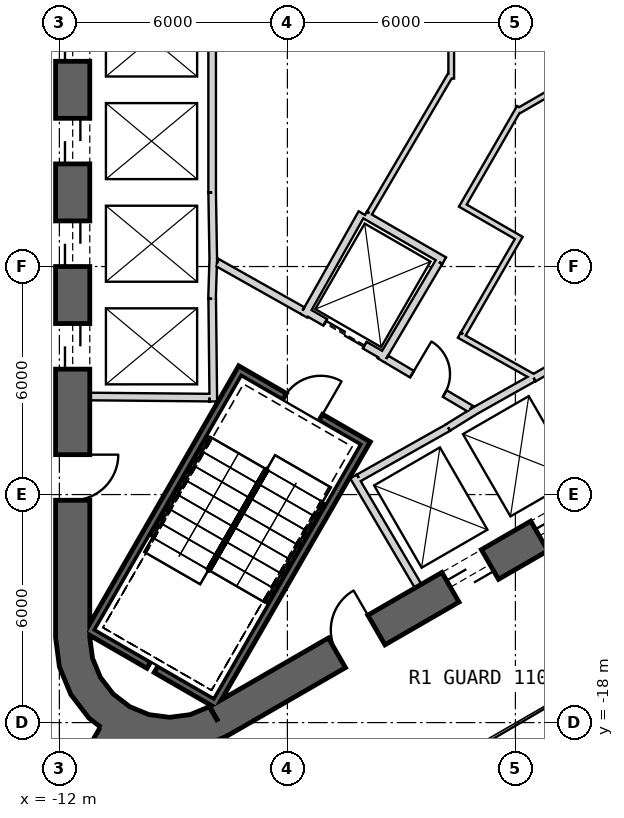
"""IFC4 building model, lengths in metres.
Left out: names, types, materials, properties, quantities, classifications, styles, units other than length and angle.
Written with IfcOpenShell. Run it as: python <this file> out.ifc"""

import sys

from ifc_helpers import new_model, si_unit, direction, frame, frame_2d, origin, place, context, subcontext, project, spatial, polyline, rectangle, outline, extrude, element, fill, save


model = new_model("IFC4")
c1 = context("Model", 3, precision=1e-05, world=origin(), true_north=direction((0.0, 1.0)))
c2 = subcontext(c1, "Body", "Model", "MODEL_VIEW")
j1 = project(units=[si_unit("LENGTHUNIT", "METRE"), si_unit("PLANEANGLEUNIT", "RADIAN")], contexts=[c1])
p1 = place(None, origin())
s1 = spatial("IfcSite", under=j1, at=p1, CompositionType="ELEMENT")
p2 = place(p1, origin())
s2 = spatial("IfcBuilding", under=s1, at=p2, CompositionType="ELEMENT")
p3 = place(p2, frame((0.0, 0.0, 21.5)))
s3 = spatial("IfcBuildingStorey", under=s2, at=p3, CompositionType="ELEMENT", Elevation=21.5)
p4 = place(p3, frame((-11.65, 15.762, 0.0), z_axis=(0.0, 0.0, 1.0), x_axis=(0.0, -1.0, 0.0)))
e1 = element("IfcWall", 1, at=p4, inside=s3, PredefinedType="SHEAR", context=c2, shape_type="SweptSolid", body=[
    extrude(rectangle(XDim=31.523, YDim=0.9, at=frame_2d((15.762, 0.0))), origin(), (0.0, 0.0, 1.0), 6.0),
])
p5 = place(p4, frame((7.062, 0.0, 0.0)))
e2 = element("IfcOpeningElement", 2, at=p5, cuts=e1, PredefinedType="OPENING", context=c2, shape_type="SweptSolid", body=[
    extrude(rectangle(XDim=1.2, YDim=2.4, at=frame_2d((0.6, 1.2))), frame((0.0, 0.46, 0.0), z_axis=(0.0, -1.0, 0.0), x_axis=(1.0, 0.0, 0.0)), (0.0, 0.0, 1.0), 0.92),
])
p6 = place(p4, frame((9.762, 0.0, 0.0)))
e3 = element("IfcOpeningElement", 3, at=p6, cuts=e1, PredefinedType="OPENING", context=c2, shape_type="SweptSolid", body=[
    extrude(rectangle(XDim=1.2, YDim=2.4, at=frame_2d((0.6, 1.2))), frame((0.0, 0.46, 0.0), z_axis=(0.0, -1.0, 0.0), x_axis=(1.0, 0.0, 0.0)), (0.0, 0.0, 1.0), 0.92),
])
p7 = place(p4, frame((12.462, 0.0, 0.0)))
e4 = element("IfcOpeningElement", 4, at=p7, cuts=e1, PredefinedType="OPENING", context=c2, shape_type="SweptSolid", body=[
    extrude(rectangle(XDim=1.2, YDim=2.4, at=frame_2d((0.6, 1.2))), frame((0.0, 0.46, 0.0), z_axis=(0.0, -1.0, 0.0), x_axis=(1.0, 0.0, 0.0)), (0.0, 0.0, 1.0), 0.92),
])
p8 = place(p4, frame((15.162, 0.0, 0.0)))
e5 = element("IfcOpeningElement", 5, at=p8, cuts=e1, PredefinedType="OPENING", context=c2, shape_type="SweptSolid", body=[
    extrude(rectangle(XDim=1.2, YDim=2.4, at=frame_2d((0.6, 1.2))), frame((0.0, 0.46, 0.0), z_axis=(0.0, -1.0, 0.0), x_axis=(1.0, 0.0, 0.0)), (0.0, 0.0, 1.0), 0.92),
])
p9 = place(p4, frame((17.862, 0.0, 0.0)))
e6 = element("IfcOpeningElement", 6, at=p9, cuts=e1, PredefinedType="OPENING", context=c2, shape_type="SweptSolid", body=[
    extrude(rectangle(XDim=1.2, YDim=2.4, at=frame_2d((0.6, 1.2))), frame((0.0, 0.46, 0.0), z_axis=(0.0, -1.0, 0.0), x_axis=(1.0, 0.0, 0.0)), (0.0, 0.0, 1.0), 0.92),
])
p10 = place(p4, frame((20.562, 0.0, 0.0)))
e7 = element("IfcOpeningElement", 7, at=p10, cuts=e1, PredefinedType="OPENING", context=c2, shape_type="SweptSolid", body=[
    extrude(rectangle(XDim=1.2, YDim=2.4, at=frame_2d((0.6, 1.2))), frame((0.0, 0.46, 0.0), z_axis=(0.0, -1.0, 0.0), x_axis=(1.0, 0.0, 0.0)), (0.0, 0.0, 1.0), 0.92),
])
p11 = place(p4, frame((23.262, 0.0, 0.0)))
e8 = element("IfcOpeningElement", 8, at=p11, cuts=e1, PredefinedType="OPENING", context=c2, shape_type="SweptSolid", body=[
    extrude(rectangle(XDim=1.2, YDim=2.4, at=frame_2d((0.6, 1.2))), frame((0.0, 0.46, 0.0), z_axis=(0.0, -1.0, 0.0), x_axis=(1.0, 0.0, 0.0)), (0.0, 0.0, 1.0), 0.92),
])
p12 = place(p4, frame((3.612, 0.0, 0.0)))
e9 = element("IfcOpeningElement", 9, at=p12, cuts=e1, PredefinedType="OPENING", context=c2, shape_type="SweptSolid", body=[
    extrude(rectangle(XDim=1.2, YDim=2.4, at=frame_2d((0.6, 1.2))), frame((0.0, 0.46, 0.0), z_axis=(0.0, -1.0, 0.0), x_axis=(1.0, 0.0, 0.0)), (0.0, 0.0, 1.0), 0.92),
])
p13 = place(p4, frame((26.712, 0.0, 0.0)))
e10 = element("IfcOpeningElement", 10, at=p13, cuts=e1, PredefinedType="OPENING", context=c2, shape_type="SweptSolid", body=[
    extrude(rectangle(XDim=1.2, YDim=2.4, at=frame_2d((0.6, 1.2))), frame((0.0, 0.46, 0.0), z_axis=(0.0, -1.0, 0.0), x_axis=(1.0, 0.0, 0.0)), (0.0, 0.0, 1.0), 0.92),
])
p14 = place(p3, frame((-7.825, -17.97, 0.0), z_axis=(0.0, 0.0, 1.0), x_axis=(0.866028369851, 0.499994862586, 0.0)))
e11 = element("IfcWall", 11, at=p14, inside=s3, PredefinedType="SHEAR", context=c2, shape_type="SweptSolid", body=[
    extrude(rectangle(XDim=31.523, YDim=0.9, at=frame_2d((15.762, 0.0))), origin(), (0.0, 0.0, 1.0), 6.0),
])
p15 = place(p14, frame((7.062, 0.0, 0.0)))
e12 = element("IfcOpeningElement", 12, at=p15, cuts=e11, PredefinedType="OPENING", context=c2, shape_type="SweptSolid", body=[
    extrude(rectangle(XDim=1.2, YDim=2.4, at=frame_2d((0.6, 1.2))), frame((0.0, 0.46, 0.0), z_axis=(0.0, -1.0, 0.0), x_axis=(1.0, 0.0, 0.0)), (0.0, 0.0, 1.0), 0.92),
])
p16 = place(p14, frame((9.762, 0.0, 0.0)))
e13 = element("IfcOpeningElement", 13, at=p16, cuts=e11, PredefinedType="OPENING", context=c2, shape_type="SweptSolid", body=[
    extrude(rectangle(XDim=1.2, YDim=2.4, at=frame_2d((0.6, 1.2))), frame((0.0, 0.46, 0.0), z_axis=(0.0, -1.0, 0.0), x_axis=(1.0, 0.0, 0.0)), (0.0, 0.0, 1.0), 0.92),
])
p17 = place(p14, frame((12.462, 0.0, 0.0)))
e14 = element("IfcOpeningElement", 14, at=p17, cuts=e11, PredefinedType="OPENING", context=c2, shape_type="SweptSolid", body=[
    extrude(rectangle(XDim=1.2, YDim=2.4, at=frame_2d((0.6, 1.2))), frame((0.0, 0.46, 0.0), z_axis=(0.0, -1.0, 0.0), x_axis=(1.0, 0.0, 0.0)), (0.0, 0.0, 1.0), 0.92),
])
p18 = place(p14, frame((15.162, 0.0, 0.0)))
e15 = element("IfcOpeningElement", 15, at=p18, cuts=e11, PredefinedType="OPENING", context=c2, shape_type="SweptSolid", body=[
    extrude(rectangle(XDim=1.2, YDim=2.4, at=frame_2d((0.6, 1.2))), frame((0.0, 0.46, 0.0), z_axis=(0.0, -1.0, 0.0), x_axis=(1.0, 0.0, 0.0)), (0.0, 0.0, 1.0), 0.92),
])
p19 = place(p14, frame((17.862, 0.0, 0.0)))
e16 = element("IfcOpeningElement", 16, at=p19, cuts=e11, PredefinedType="OPENING", context=c2, shape_type="SweptSolid", body=[
    extrude(rectangle(XDim=1.2, YDim=2.4, at=frame_2d((0.6, 1.2))), frame((0.0, 0.46, 0.0), z_axis=(0.0, -1.0, 0.0), x_axis=(1.0, 0.0, 0.0)), (0.0, 0.0, 1.0), 0.92),
])
p20 = place(p14, frame((20.562, 0.0, 0.0)))
e17 = element("IfcOpeningElement", 17, at=p20, cuts=e11, PredefinedType="OPENING", context=c2, shape_type="SweptSolid", body=[
    extrude(rectangle(XDim=1.2, YDim=2.4, at=frame_2d((0.6, 1.2))), frame((0.0, 0.46, 0.0), z_axis=(0.0, -1.0, 0.0), x_axis=(1.0, 0.0, 0.0)), (0.0, 0.0, 1.0), 0.92),
])
p21 = place(p14, frame((26.712, 0.0, 0.0)))
e18 = element("IfcOpeningElement", 18, at=p21, cuts=e11, PredefinedType="OPENING", context=c2, shape_type="SweptSolid", body=[
    extrude(rectangle(XDim=1.2, YDim=2.4, at=frame_2d((0.6, 1.2))), frame((0.0, 0.46, 0.0), z_axis=(0.0, -1.0, 0.0), x_axis=(1.0, 0.0, 0.0)), (0.0, 0.0, 1.0), 0.92),
])
p22 = place(p14, frame((3.612, 0.0, 0.0)))
e19 = element("IfcOpeningElement", 19, at=p22, cuts=e11, PredefinedType="OPENING", context=c2, shape_type="SweptSolid", body=[
    extrude(rectangle(XDim=1.2, YDim=2.4, at=frame_2d((0.6, 1.2))), frame((0.0, 0.46, 0.0), z_axis=(0.0, -1.0, 0.0), x_axis=(1.0, 0.0, 0.0)), (0.0, 0.0, 1.0), 0.92),
])
p23 = place(p3, origin())
e20 = element("IfcWall", 20, at=p23, inside=s3, PredefinedType="SHEAR", context=c2, shape_type="SweptSolid", body=[
    extrude(outline(polyline([(-12.1, -15.762), (-11.998, -16.538), (-11.698, -17.262), (-11.221, -17.883), (-10.6, -18.36), (-9.876, -18.659), (-9.1, -18.762), (-8.323, -18.659), (-7.6, -18.36), (-8.05, -17.58), (-8.556, -17.79), (-9.1, -17.862), (-9.644, -17.79), (-10.15, -17.58), (-10.585, -17.247), (-10.919, -16.812), (-11.128, -16.305), (-11.2, -15.762), (-12.1, -15.762)])), origin(), (0.0, 0.0, 1.0), 6.0),
])
p24 = place(p3, frame((-10.575, -18.316, 0.0), z_axis=(0.0, 0.0, 1.0), x_axis=(-0.499996575515, -0.866027380903, 0.0)))
e21 = element("IfcWall", 21, at=p24, inside=s3, PredefinedType="SHEAR", context=c2, shape_type="SweptSolid", body=[
    extrude(rectangle(XDim=13.954, YDim=0.8, at=frame_2d((6.977, 0.0))), origin(), (0.0, 0.0, 1.0), 6.0),
])
p25 = place(p24, frame((2.05, 0.0, 0.0)))
e22 = element("IfcOpeningElement", 22, at=p25, cuts=e21, PredefinedType="OPENING", context=c2, shape_type="SweptSolid", body=[
    extrude(rectangle(XDim=1.4, YDim=2.4, at=frame_2d((0.7, 1.2))), frame((0.0, 0.41, 0.0), z_axis=(0.0, -1.0, 0.0), x_axis=(1.0, 0.0, 0.0)), (0.0, 0.0, 1.0), 0.82),
])
p26 = place(p3, frame((-7.98, 4.05, 0.0), z_axis=(0.0, 0.0, 1.0), x_axis=(0.0, -1.0, 0.0)))
e23 = element("IfcWall", 23, at=p26, inside=s3, PredefinedType="PLUMBINGWALL", context=c2, shape_type="SweptSolid", body=[
    extrude(rectangle(XDim=8.1, YDim=0.2, at=frame_2d((4.05, 0.0))), origin(), (0.0, 0.0, 1.0), 5.7),
])
p27 = place(p3, frame((-7.95, -5.772, 0.0), z_axis=(0.0, 0.0, 1.0), x_axis=(-0.030803413295, -0.999525462272, 0.0)))
e24 = element("IfcWall", 24, at=p27, inside=s3, PredefinedType="PLUMBINGWALL", context=c2, shape_type="SweptSolid", body=[
    extrude(rectangle(XDim=1.078, YDim=0.2, at=frame_2d((0.539, 0.0))), origin(), (0.0, 0.0, 1.0), 5.7),
])
p28 = place(p3, frame((-7.98, -4.05, 0.0), z_axis=(0.0, 0.0, 1.0), x_axis=(0.016809909365, -0.999858703491, 0.0)))
e25 = element("IfcWall", 25, at=p28, inside=s3, PredefinedType="PLUMBINGWALL", context=c2, shape_type="SweptSolid", body=[
    extrude(rectangle(XDim=1.844, YDim=0.2, at=frame_2d((0.922, 0.0))), origin(), (0.0, 0.0, 1.0), 5.7),
])
p29 = place(p3, frame((-7.979, -6.85, 0.0), z_axis=(0.0, 0.0, 1.0), x_axis=(0.011121475088, -0.999938154483, 0.0)))
e26 = element("IfcWall", 26, at=p29, inside=s3, PredefinedType="PLUMBINGWALL", context=c2, shape_type="SweptSolid", body=[
    extrude(rectangle(XDim=2.7, YDim=0.2, at=frame_2d((1.35, 0.0))), origin(), (0.0, 0.0, 1.0), 5.7),
])
p30 = place(p3, frame((-8.05, -9.449, 0.0), z_axis=(0.0, 0.0, 1.0), x_axis=(-0.999957467379, 0.009222983926, 0.0)))
e27 = element("IfcWall", 27, at=p30, inside=s3, PredefinedType="PLUMBINGWALL", context=c2, shape_type="SweptSolid", body=[
    extrude(rectangle(XDim=3.15, YDim=0.2, at=frame_2d((1.575, 0.0))), origin(), (0.0, 0.0, 1.0), 5.7),
])
p31 = place(p3, frame((0.483, -8.936, 0.0), z_axis=(0.0, 0.0, 1.0), x_axis=(0.866030989016, 0.499990325971, 0.0)))
e28 = element("IfcWall", 28, at=p31, inside=s3, PredefinedType="PLUMBINGWALL", context=c2, shape_type="SweptSolid", body=[
    extrude(rectangle(XDim=8.1, YDim=0.2, at=frame_2d((4.05, 0.0))), origin(), (0.0, 0.0, 1.0), 5.7),
])
p32 = place(p3, frame((-2.558, -14.409, 0.0), z_axis=(0.0, 0.0, 1.0), x_axis=(-0.507997497166, 0.861358544901, 0.0)))
e29 = element("IfcWall", 29, at=p32, inside=s3, PredefinedType="PLUMBINGWALL", context=c2, shape_type="SweptSolid", body=[
    extrude(rectangle(XDim=3.35, YDim=0.2, at=frame_2d((1.675, 0.0))), origin(), (0.0, 0.0, 1.0), 5.7),
])
p33 = place(p3, frame((-1.769, -10.237, 0.0), z_axis=(0.0, 0.0, 1.0), x_axis=(-0.871534483978, -0.490334215854, 0.0)))
e30 = element("IfcWall", 30, at=p33, inside=s3, PredefinedType="PLUMBINGWALL", context=c2, shape_type="SweptSolid", body=[
    extrude(rectangle(XDim=2.7, YDim=0.2, at=frame_2d((1.35, 0.0))), origin(), (0.0, 0.0, 1.0), 5.7),
])
p34 = place(p3, frame((-1.024, -9.771, 0.0), z_axis=(0.0, 0.0, 1.0), x_axis=(-0.850348075135, -0.526220629693, 0.0)))
e31 = element("IfcWall", 31, at=p34, inside=s3, PredefinedType="PLUMBINGWALL", context=c2, shape_type="SweptSolid", body=[
    extrude(rectangle(XDim=0.878, YDim=0.2, at=frame_2d((0.439, 0.0))), origin(), (0.0, 0.0, 1.0), 5.7),
])
p35 = place(p3, frame((-1.13, -9.832, 0.0), z_axis=(0.0, 0.0, 1.0), x_axis=(0.871988740738, 0.489525929882, 0.0)))
e32 = element("IfcWall", 32, at=p35, inside=s3, PredefinedType="PLUMBINGWALL", context=c2, shape_type="SweptSolid", body=[
    extrude(rectangle(XDim=1.845, YDim=0.2, at=frame_2d((0.922, 0.0))), origin(), (0.0, 0.0, 1.0), 5.7),
])
p36 = place(p3, frame((-3.905, -10.563, -0.3), z_axis=(0.0, 0.0, 1.0), x_axis=(-0.500012932018, -0.866017937352, 0.0)))
e33 = element("IfcWall", 33, at=p36, inside=s3, PredefinedType="SHEAR", context=c2, shape_type="SweptSolid", body=[
    extrude(rectangle(XDim=8.1, YDim=0.2, at=frame_2d((4.05, 0.0))), origin(), (0.0, 0.0, 1.0), 6.0),
])
p37 = place(p3, frame((-11.282, -15.541, -0.3), z_axis=(0.0, 0.0, 1.0), x_axis=(0.866000578957, -0.500042995397, 0.0)))
e34 = element("IfcWall", 34, at=p37, inside=s3, PredefinedType="SHEAR", context=c2, shape_type="SweptSolid", body=[
    extrude(rectangle(XDim=1.89, YDim=0.2, at=frame_2d((0.945, 0.0))), origin(), (0.0, 0.0, 1.0), 6.0),
])
p38 = place(p3, frame((-9.455, -16.596, -0.3), z_axis=(0.0, 0.0, 1.0), x_axis=(0.866038843867, -0.499976720371, 0.0)))
e35 = element("IfcWall", 35, at=p38, inside=s3, PredefinedType="SHEAR", context=c2, shape_type="SweptSolid", body=[
    extrude(rectangle(XDim=1.69, YDim=0.2, at=frame_2d((0.845, 0.0))), origin(), (0.0, 0.0, 1.0), 6.0),
])
p39 = place(p3, frame((-7.196, -8.663, -0.3), z_axis=(0.0, 0.0, 1.0), x_axis=(-0.499997992926, -0.866026562566, 0.0)))
e36 = element("IfcWall", 36, at=p39, inside=s3, PredefinedType="SHEAR", context=c2, shape_type="SweptSolid", body=[
    extrude(rectangle(XDim=7.9, YDim=0.2, at=frame_2d((3.95, 0.0))), origin(), (0.0, 0.0, 1.0), 6.0),
])
p40 = place(p3, frame((-4.041, -10.599, -0.3), z_axis=(0.0, 0.0, 1.0), x_axis=(-0.866047807691, 0.499961193289, 0.0)))
e37 = element("IfcWall", 37, at=p40, inside=s3, PredefinedType="SHEAR", context=c2, shape_type="SweptSolid", body=[
    extrude(rectangle(XDim=3.6, YDim=0.2, at=frame_2d((1.8, 0.0))), origin(), (0.0, 0.0, 1.0), 6.0),
])
p41 = place(p40, frame((1.25, 0.0, 0.3)))
e38 = element("IfcOpeningElement", 38, at=p41, cuts=e37, PredefinedType="OPENING", context=c2, shape_type="SweptSolid", body=[
    extrude(rectangle(XDim=1.1, YDim=2.1, at=frame_2d((0.55, 1.05))), frame((0.0, 0.11, 0.0), z_axis=(0.0, -1.0, 0.0), x_axis=(1.0, 0.0, 0.0)), (0.0, 0.0, 1.0), 0.22),
])
p42 = place(p3, frame((-3.446, -8.368, 0.0), z_axis=(0.0, 0.0, 1.0), x_axis=(-0.866024647952, 0.500001309137, 0.0)))
e39 = element("IfcWall", 39, at=p42, inside=s3, PredefinedType="PLUMBINGWALL", context=c2, shape_type="SweptSolid", body=[
    extrude(rectangle(XDim=2.4, YDim=0.2, at=frame_2d((1.2, 0.0))), origin(), (0.0, 0.0, 1.0), 5.7),
])
p43 = place(p42, frame((0.6, 0.0, 0.0)))
e40 = element("IfcOpeningElement", 40, at=p43, cuts=e39, PredefinedType="OPENING", context=c2, shape_type="SweptSolid", body=[
    extrude(rectangle(XDim=1.2, YDim=2.4, at=frame_2d((0.6, 1.2))), frame((0.0, 0.11, 0.0), z_axis=(0.0, -1.0, 0.0), x_axis=(1.0, 0.0, 0.0)), (0.0, 0.0, 1.0), 0.22),
])
p44 = place(p3, frame((-5.562, -7.296, 0.0), z_axis=(0.0, 0.0, 1.0), x_axis=(0.491322718731, 0.870977603649, 0.0)))
e41 = element("IfcWall", 41, at=p44, inside=s3, PredefinedType="PLUMBINGWALL", context=c2, shape_type="SweptSolid", body=[
    extrude(rectangle(XDim=3.1, YDim=0.2, at=frame_2d((1.55, 0.0))), origin(), (0.0, 0.0, 1.0), 5.7),
])
p45 = place(p3, frame((-3.957, -4.644, 0.0), z_axis=(0.0, 0.0, 1.0), x_axis=(0.865991127953, -0.500059362782, 0.0)))
e42 = element("IfcWall", 42, at=p45, inside=s3, PredefinedType="PLUMBINGWALL", context=c2, shape_type="SweptSolid", body=[
    extrude(rectangle(XDim=2.405, YDim=0.2, at=frame_2d((1.202, 0.0))), origin(), (0.0, 0.0, 1.0), 5.7),
])
p46 = place(p3, frame((-2.012, -5.882, 0.0), z_axis=(0.0, 0.0, 1.0), x_axis=(-0.508619639323, -0.860991325447, 0.0)))
e43 = element("IfcWall", 43, at=p46, inside=s3, PredefinedType="PLUMBINGWALL", context=c2, shape_type="SweptSolid", body=[
    extrude(rectangle(XDim=3.0, YDim=0.2, at=frame_2d((1.5, 0.0))), origin(), (0.0, 0.0, 1.0), 5.7),
])
p47 = place(p3, frame((-7.849, -5.894, 0.0), z_axis=(0.0, 0.0, 1.0), x_axis=(0.871340486379, -0.490678873396, 0.0)))
e44 = element("IfcWall", 44, at=p47, inside=s3, PredefinedType="PARTITIONING", context=c2, shape_type="SweptSolid", body=[
    extrude(rectangle(XDim=2.581, YDim=0.2, at=frame_2d((1.291, 0.0))), origin(), (0.0, 0.0, 1.0), 5.7),
])
p48 = place(p3, frame((-3.401, -8.43, 0.0), z_axis=(0.0, 0.0, 1.0), x_axis=(0.860598681535, -0.509283721849, 0.0)))
e45 = element("IfcWall", 45, at=p48, inside=s3, PredefinedType="PARTITIONING", context=c2, shape_type="SweptSolid", body=[
    extrude(rectangle(XDim=2.581, YDim=0.2, at=frame_2d((1.291, 0.0))), origin(), (0.0, 0.0, 1.0), 5.7),
])
p49 = place(p48, frame((0.791, 0.0, 0.0)))
e46 = element("IfcOpeningElement", 46, at=p49, cuts=e45, PredefinedType="OPENING", context=c2, shape_type="SweptSolid", body=[
    extrude(rectangle(XDim=1.0, YDim=2.1, at=frame_2d((0.5, 1.05))), frame((0.0, 0.11, 0.0), z_axis=(0.0, -1.0, 0.0), x_axis=(1.0, 0.0, 0.0)), (0.0, 0.0, 1.0), 0.22),
])
p50 = place(p3, frame((-1.689, -1.053, 0.0), z_axis=(0.0, 0.0, 1.0), x_axis=(0.0, 1.0, 0.0)))
e47 = element("IfcWall", 47, at=p50, inside=s3, PredefinedType="PLUMBINGWALL", context=c2, shape_type="SweptSolid", body=[
    extrude(rectangle(XDim=1.954, YDim=0.15, at=frame_2d((0.977, 0.0))), origin(), (0.0, 0.0, 1.0), 5.7),
])
p51 = place(p3, frame((-3.841, -4.595, 0.0), z_axis=(0.0, 0.0, 1.0), x_axis=(0.505857207696, 0.862617229959, 0.0)))
e48 = element("IfcWall", 48, at=p51, inside=s3, PredefinedType="PLUMBINGWALL", context=c2, shape_type="SweptSolid", body=[
    extrude(rectangle(XDim=4.231, YDim=0.15, at=frame_2d((2.116, 0.0))), origin(), (0.0, 0.0, 1.0), 5.7),
])
p52 = place(p3, frame((-1.477, -7.808, 0.0), z_axis=(0.0, 0.0, 1.0), x_axis=(0.871822901869, -0.48982122022, 0.0)))
e49 = element("IfcWall", 49, at=p52, inside=s3, PredefinedType="PLUMBINGWALL", context=c2, shape_type="SweptSolid", body=[
    extrude(rectangle(XDim=2.24, YDim=0.15, at=frame_2d((1.12, 0.0))), origin(), (0.0, 0.0, 1.0), 5.7),
])
p53 = place(p3, frame((0.126, -5.182, 0.0), z_axis=(0.0, 0.0, 1.0), x_axis=(-0.499990139034, -0.866031096941, 0.0)))
e50 = element("IfcWall", 50, at=p53, inside=s3, PredefinedType="PLUMBINGWALL", context=c2, shape_type="SweptSolid", body=[
    extrude(rectangle(XDim=3.0, YDim=0.15, at=frame_2d((1.5, 0.0))), origin(), (0.0, 0.0, 1.0), 5.7),
])
p54 = place(p3, frame((-1.449, -4.36, 0.0), z_axis=(0.0, 0.0, 1.0), x_axis=(0.866025371046, -0.500000056704, 0.0)))
e51 = element("IfcWall", 51, at=p54, inside=s3, PredefinedType="PLUMBINGWALL", context=c2, shape_type="SweptSolid", body=[
    extrude(rectangle(XDim=1.7, YDim=0.15, at=frame_2d((0.85, 0.0))), origin(), (0.0, 0.0, 1.0), 5.7),
])
p55 = place(p3, frame((0.108, -1.812, 0.0), z_axis=(0.0, 0.0, 1.0), x_axis=(-0.49994762993, -0.866055637547, 0.0)))
e52 = element("IfcWall", 52, at=p55, inside=s3, PredefinedType="PLUMBINGWALL", context=c2, shape_type="SweptSolid", body=[
    extrude(rectangle(XDim=2.909, YDim=0.15, at=frame_2d((1.455, 0.0))), origin(), (0.0, 0.0, 1.0), 5.7),
])
p56 = place(p3, frame((1.756, -0.936, 0.0), z_axis=(0.0, 0.0, 1.0), x_axis=(-0.86601293162, -0.5000216018, 0.0)))
e53 = element("IfcWall", 53, at=p56, inside=s3, PredefinedType="PLUMBINGWALL", context=c2, shape_type="SweptSolid", body=[
    extrude(rectangle(XDim=1.955, YDim=0.15, at=frame_2d((0.977, 0.0))), origin(), (0.0, 0.0, 1.0), 5.7),
])
p57 = place(p41, origin())
e54 = element("IfcDoor", 54, at=p57, inside=s3, OperationType="SINGLE_SWING_LEFT", PredefinedType="USERDEFINED", context=c2, shape_type="SweptSolid", body=[
    extrude(rectangle(XDim=1.1, YDim=2.1, at=frame_2d((0.55, 1.05))), frame((0.0, 0.025, 0.0), z_axis=(0.0, -1.0, 0.0), x_axis=(1.0, 0.0, 0.0)), (0.0, 0.0, 1.0), 0.05),
])
fill(e38, e54)
p58 = place(p49, origin())
e55 = element("IfcDoor", 55, at=p58, inside=s3, OperationType="SINGLE_SWING_LEFT", PredefinedType="USERDEFINED", context=c2, shape_type="SweptSolid", body=[
    extrude(rectangle(XDim=1.0, YDim=2.1, at=frame_2d((0.5, 1.05))), frame((0.0, 0.025, 0.0), z_axis=(0.0, -1.0, 0.0), x_axis=(1.0, 0.0, 0.0)), (0.0, 0.0, 1.0), 0.05),
])
fill(e46, e55)
p59 = place(p43, origin())
e56 = element("IfcDoor", 56, at=p59, inside=s3, OperationType="SLIDING_TO_LEFT", PredefinedType="USERDEFINED", context=c2, shape_type="SweptSolid", body=[
    extrude(rectangle(XDim=1.2, YDim=2.4, at=frame_2d((0.6, 1.2))), frame((0.0, 0.025, 0.0), z_axis=(0.0, -1.0, 0.0), x_axis=(1.0, 0.0, 0.0)), (0.0, 0.0, 1.0), 0.05),
])
fill(e40, e56)
p60 = place(p8, origin())
e57 = element("IfcDoor", 57, at=p60, inside=s3, OperationType="SLIDING_TO_LEFT", PredefinedType="USERDEFINED", context=c2, shape_type="SweptSolid", body=[
    extrude(rectangle(XDim=1.2, YDim=2.4, at=frame_2d((0.6, 1.2))), frame((0.0, 0.025, 0.0), z_axis=(0.0, -1.0, 0.0), x_axis=(1.0, 0.0, 0.0)), (0.0, 0.0, 1.0), 0.05),
])
fill(e5, e57)
p61 = place(p9, origin())
e58 = element("IfcDoor", 58, at=p61, inside=s3, OperationType="SLIDING_TO_LEFT", PredefinedType="USERDEFINED", context=c2, shape_type="SweptSolid", body=[
    extrude(rectangle(XDim=1.2, YDim=2.4, at=frame_2d((0.6, 1.2))), frame((0.0, 0.025, 0.0), z_axis=(0.0, -1.0, 0.0), x_axis=(1.0, 0.0, 0.0)), (0.0, 0.0, 1.0), 0.05),
])
fill(e6, e58)
p62 = place(p10, origin())
e59 = element("IfcDoor", 59, at=p62, inside=s3, OperationType="SLIDING_TO_LEFT", PredefinedType="USERDEFINED", context=c2, shape_type="SweptSolid", body=[
    extrude(rectangle(XDim=1.2, YDim=2.4, at=frame_2d((0.6, 1.2))), frame((0.0, 0.025, 0.0), z_axis=(0.0, -1.0, 0.0), x_axis=(1.0, 0.0, 0.0)), (0.0, 0.0, 1.0), 0.05),
])
fill(e7, e59)
p63 = place(p11, origin())
e60 = element("IfcDoor", 60, at=p63, inside=s3, OperationType="SLIDING_TO_LEFT", PredefinedType="USERDEFINED", context=c2, shape_type="SweptSolid", body=[
    extrude(rectangle(XDim=1.2, YDim=2.4, at=frame_2d((0.6, 1.2))), frame((0.0, 0.025, 0.0), z_axis=(0.0, -1.0, 0.0), x_axis=(1.0, 0.0, 0.0)), (0.0, 0.0, 1.0), 0.05),
])
fill(e8, e60)
p64 = place(p15, origin())
e61 = element("IfcDoor", 61, at=p64, inside=s3, OperationType="SLIDING_TO_LEFT", PredefinedType="USERDEFINED", context=c2, shape_type="SweptSolid", body=[
    extrude(rectangle(XDim=1.2, YDim=2.4, at=frame_2d((0.6, 1.2))), frame((0.0, 0.025, 0.0), z_axis=(0.0, -1.0, 0.0), x_axis=(1.0, 0.0, 0.0)), (0.0, 0.0, 1.0), 0.05),
])
fill(e12, e61)
p65 = place(p16, origin())
e62 = element("IfcDoor", 62, at=p65, inside=s3, OperationType="SLIDING_TO_LEFT", PredefinedType="USERDEFINED", context=c2, shape_type="SweptSolid", body=[
    extrude(rectangle(XDim=1.2, YDim=2.4, at=frame_2d((0.6, 1.2))), frame((0.0, 0.025, 0.0), z_axis=(0.0, -1.0, 0.0), x_axis=(1.0, 0.0, 0.0)), (0.0, 0.0, 1.0), 0.05),
])
fill(e13, e62)
p66 = place(p13, origin())
e63 = element("IfcDoor", 63, at=p66, inside=s3, OperationType="SINGLE_SWING_LEFT", PredefinedType="USERDEFINED", context=c2, shape_type="SweptSolid", body=[
    extrude(rectangle(XDim=1.2, YDim=2.4, at=frame_2d((0.6, 1.2))), frame((0.0, 0.025, 0.0), z_axis=(0.0, -1.0, 0.0), x_axis=(1.0, 0.0, 0.0)), (0.0, 0.0, 1.0), 0.05),
])
fill(e10, e63)
p67 = place(p22, origin())
e64 = element("IfcDoor", 64, at=p67, inside=s3, OperationType="SINGLE_SWING_RIGHT", PredefinedType="USERDEFINED", context=c2, shape_type="SweptSolid", body=[
    extrude(rectangle(XDim=1.2, YDim=2.4, at=frame_2d((0.6, 1.2))), frame((0.0, 0.025, 0.0), z_axis=(0.0, -1.0, 0.0), x_axis=(1.0, 0.0, 0.0)), (0.0, 0.0, 1.0), 0.05),
])
fill(e19, e64)
save(model, sys.argv[1])
